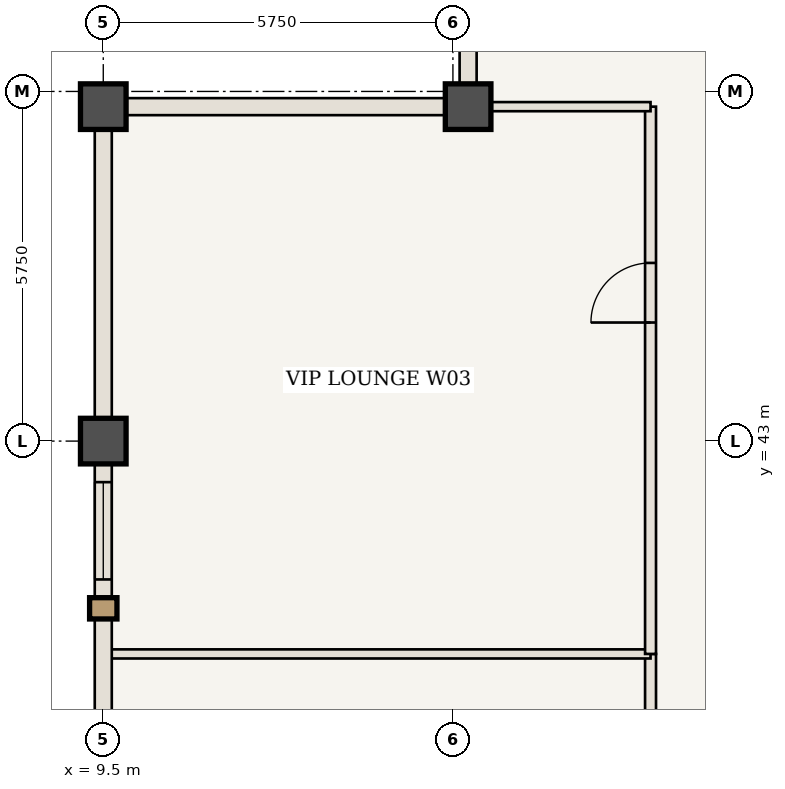
"""IFC4 building model, lengths in metres.
Left out: names, types, materials, properties, quantities, classifications, styles, units other than length and angle.
Written with IfcOpenShell. Run it as: python <this file> out.ifc"""

import sys

from ifc_helpers import new_model, si_unit, direction, frame, frame_2d, origin, origin_2d, place, context, subcontext, project, spatial, rectangle, extrude, element, fill, save


model = new_model("IFC4")
c1 = context("Model", 3, precision=1e-05, world=origin(), true_north=direction((0.0, 1.0)))
c2 = subcontext(c1, "Body", "Model", "MODEL_VIEW")
j1 = project(units=[si_unit("LENGTHUNIT", "METRE"), si_unit("PLANEANGLEUNIT", "RADIAN")], contexts=[c1])
p1 = place(None, origin())
s1 = spatial("IfcSite", under=j1, at=p1, CompositionType="ELEMENT")
p2 = place(p1, origin())
s2 = spatial("IfcBuilding", under=s1, at=p2, CompositionType="ELEMENT")
p3 = place(p2, frame((0.0, 0.0, 273.7)))
s3 = spatial("IfcBuildingStorey", under=s2, at=p3, CompositionType="ELEMENT", Elevation=273.7)
for number, where, z_axis, x_axis in (
    (1, (15.5, 48.5, 0.0), (0.0, 0.0, 1.0), (1.0, 0.0, 0.0)),
    (2, (9.5, 48.5, 0.0), (0.0, 0.0, 1.0), (1.0, 0.0, 0.0)),
    (3, (9.5, 43.0, 0.0), (0.0, 0.0, 1.0), (1.0, 0.0, 0.0)),
):
    element("IfcColumn", number, at=place(p3, frame(where, z_axis=z_axis, x_axis=x_axis)), inside=s3, PredefinedType="COLUMN", context=c2, shape_type="SweptSolid", body=[
        extrude(rectangle(XDim=0.75, YDim=0.75, at=origin_2d()), origin(), (0.0, 0.0, 1.0), 3.85),
    ])
p4 = place(p3, frame((18.5, 28.0, 0.0), z_axis=(0.0, 0.0, 1.0), x_axis=(0.0, 1.0, 0.0)))
e4 = element("IfcWall", 4, at=p4, inside=s3, PredefinedType="STANDARD", context=c2, shape_type="SweptSolid", body=[
    extrude(rectangle(XDim=11.5, YDim=0.18, at=frame_2d((5.75, 0.0))), origin(), (0.0, 0.0, 1.0), 3.685),
])
p5 = place(p4, frame((5.25, 0.0, 0.0)))
e5 = element("IfcOpeningElement", 5, at=p5, cuts=e4, PredefinedType="OPENING", context=c2, shape_type="SweptSolid", body=[
    extrude(rectangle(XDim=0.98, YDim=2.2, at=frame_2d((0.49, 1.1))), frame((0.0, 0.1, 0.0), z_axis=(0.0, -1.0, 0.0), x_axis=(1.0, 0.0, 0.0)), (0.0, 0.0, 1.0), 0.2),
])
p6 = place(p3, frame((9.56, 39.5, 0.0), z_axis=(0.0, 0.0, 1.0), x_axis=(1.0, 0.0, 0.0)))
e6 = element("IfcWall", 6, at=p6, inside=s3, PredefinedType="STANDARD", context=c2, shape_type="SweptSolid", body=[
    extrude(rectangle(XDim=8.94, YDim=0.15, at=frame_2d((4.47, 0.0))), origin(), (0.0, 0.0, 1.0), 3.685),
])
p7 = place(p3, frame((18.5, 39.5, 0.0), z_axis=(0.0, 0.0, 1.0), x_axis=(0.0, 1.0, 0.0)))
e7 = element("IfcWall", 7, at=p7, inside=s3, PredefinedType="STANDARD", context=c2, shape_type="SweptSolid", body=[
    extrude(rectangle(XDim=9.0, YDim=0.18, at=frame_2d((4.5, 0.0))), origin(), (0.0, 0.0, 1.0), 3.685),
])
p8 = place(p7, frame((5.45, 0.0, 0.0)))
e8 = element("IfcOpeningElement", 8, at=p8, cuts=e7, PredefinedType="OPENING", context=c2, shape_type="SweptSolid", body=[
    extrude(rectangle(XDim=0.98, YDim=2.2, at=frame_2d((0.49, 1.1))), frame((0.0, 0.1, 0.0), z_axis=(0.0, -1.0, 0.0), x_axis=(1.0, 0.0, 0.0)), (0.0, 0.0, 1.0), 0.2),
])
p9 = place(p3, frame((15.5, 48.5, 0.0), z_axis=(0.0, 0.0, 1.0), x_axis=(1.0, 0.0, 0.0)))
e9 = element("IfcWall", 9, at=p9, inside=s3, PredefinedType="STANDARD", context=c2, shape_type="SweptSolid", body=[
    extrude(rectangle(XDim=3.0, YDim=0.15, at=frame_2d((1.5, 0.0))), origin(), (0.0, 0.0, 1.0), 3.685),
])
p10 = place(p3, frame((9.5, 37.5, 0.0), z_axis=(0.0, 0.0, 1.0), x_axis=(0.0, 1.0, 0.0)))
e10 = element("IfcWall", 10, at=p10, inside=s3, PredefinedType="USERDEFINED", context=c2, shape_type="SweptSolid", body=[
    extrude(rectangle(XDim=5.5, YDim=0.28, at=frame_2d((2.75, 0.0))), origin(), (0.0, 0.0, 1.0), 2.985),
])
p11 = place(p10, frame((3.225, 0.0, 0.85)))
e11 = element("IfcOpeningElement", 11, at=p11, cuts=e10, PredefinedType="OPENING", context=c2, shape_type="SweptSolid", body=[
    extrude(rectangle(XDim=1.6, YDim=1.935, at=frame_2d((0.8, 0.968))), frame((0.0, 0.15, 0.0), z_axis=(0.0, -1.0, 0.0), x_axis=(1.0, 0.0, 0.0)), (0.0, 0.0, 1.0), 0.3),
])
p12 = place(p3, frame((9.5, 43.0, 0.0), z_axis=(0.0, 0.0, 1.0), x_axis=(0.0, 1.0, 0.0)))
e12 = element("IfcWall", 12, at=p12, inside=s3, PredefinedType="USERDEFINED", context=c2, shape_type="SweptSolid", body=[
    extrude(rectangle(XDim=5.5, YDim=0.28, at=frame_2d((2.75, 0.0))), origin(), (0.0, 0.0, 1.0), 2.985),
])
for number, where, z_axis, x_axis in (
    (13, (15.5, 48.5, 0.0), (0.0, 0.0, 1.0), (0.0, 1.0, 0.0)),
    (14, (9.5, 48.5, 0.0), (0.0, 0.0, 1.0), (1.0, 0.0, 0.0)),
):
    element("IfcWall", number, at=place(p3, frame(where, z_axis=z_axis, x_axis=x_axis)), inside=s3, PredefinedType="USERDEFINED", context=c2, shape_type="SweptSolid", body=[
        extrude(rectangle(XDim=6.0, YDim=0.28, at=frame_2d((3.0, 0.0))), origin(), (0.0, 0.0, 1.0), 2.985),
    ])
p13 = place(p8, origin())
e15 = element("IfcDoor", 15, at=p13, inside=s3, OperationType="SINGLE_SWING_LEFT", PredefinedType="DOOR", context=c2, shape_type="SweptSolid", body=[
    extrude(rectangle(XDim=0.98, YDim=2.2, at=frame_2d((0.49, 1.1))), frame((0.0, 0.025, 0.0), z_axis=(0.0, -1.0, 0.0), x_axis=(1.0, 0.0, 0.0)), (0.0, 0.0, 1.0), 0.05),
])
fill(e8, e15)
p14 = place(p11, origin())
e16 = element("IfcWindow", 16, at=p14, inside=s3, PartitioningType="SINGLE_PANEL", PredefinedType="WINDOW", context=c2, shape_type="SweptSolid", body=[
    extrude(rectangle(XDim=1.6, YDim=1.935, at=frame_2d((0.8, 0.968))), frame((0.0, 0.03, 0.0), z_axis=(0.0, -1.0, 0.0), x_axis=(1.0, 0.0, 0.0)), (0.0, 0.0, 1.0), 0.06),
])
fill(e11, e16)
save(model, sys.argv[1])
